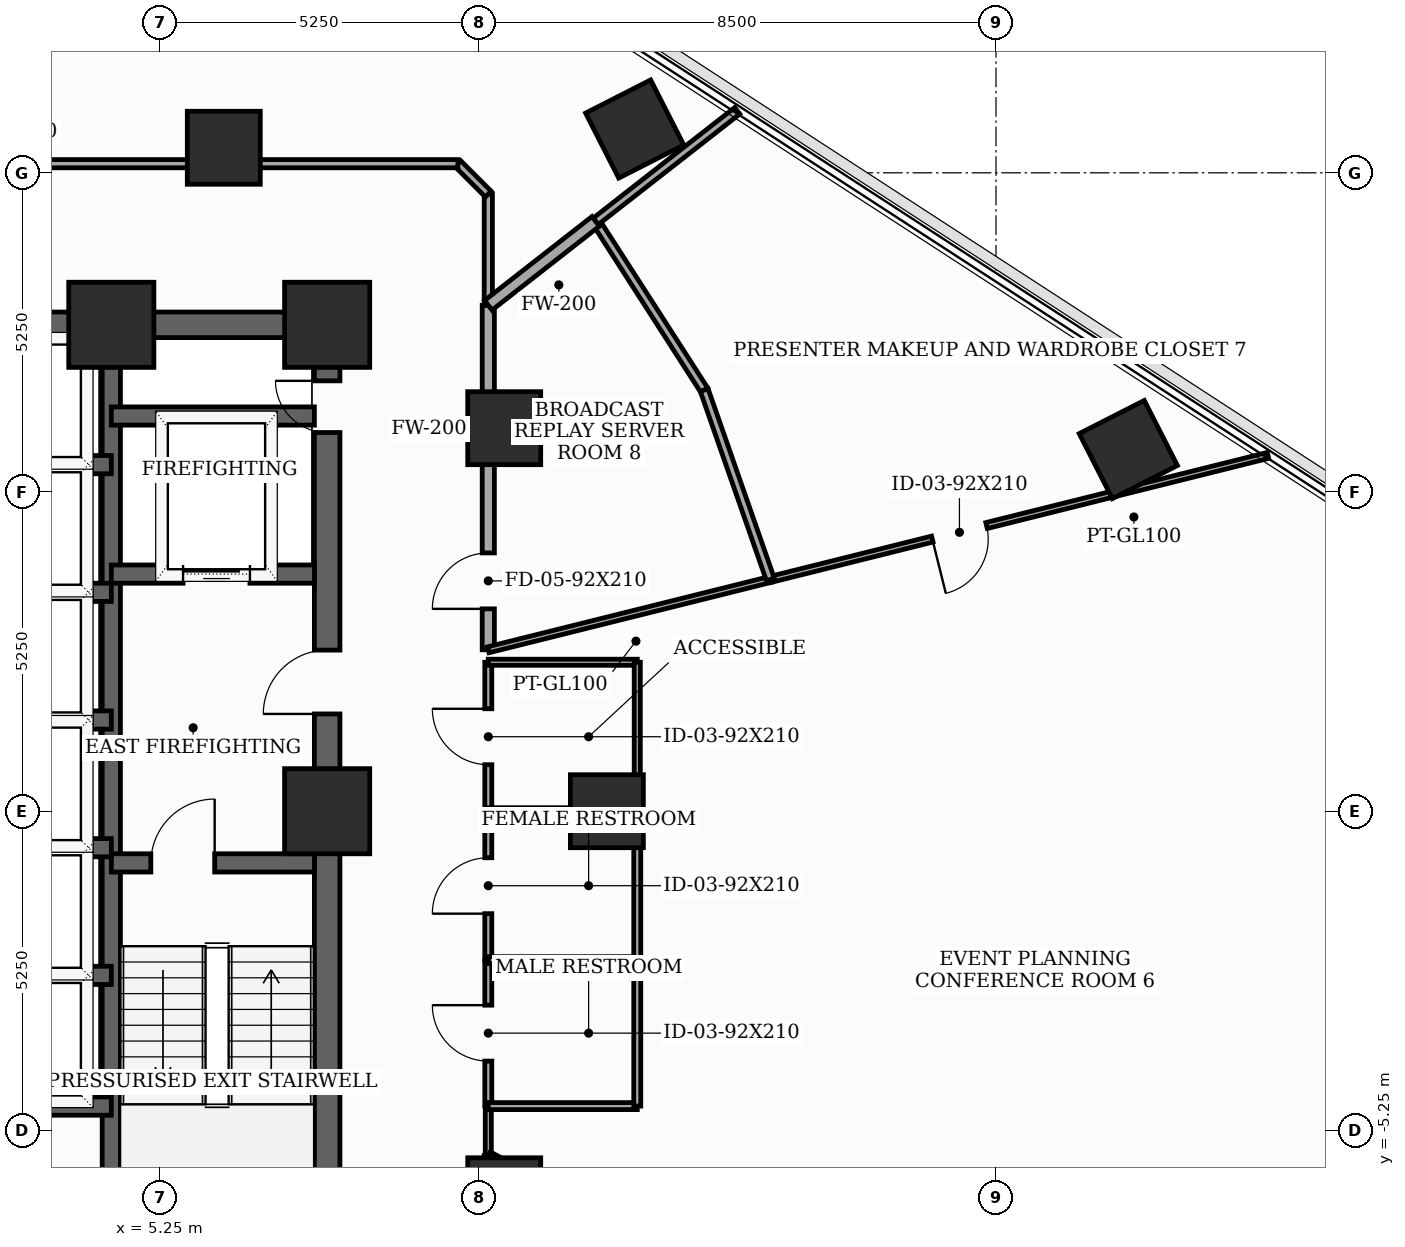
"""IFC4 building model, lengths in metres.
Left out: names, types, materials, properties, quantities, classifications, styles, units other than length and angle.
Written with IfcOpenShell. Run it as: python <this file> out.ifc"""

import sys

from ifc_helpers import new_model, si_unit, direction, frame, frame_2d, origin, origin_2d, place, context, subcontext, project, spatial, rectangle, extrude, element, fill, save


model = new_model("IFC4")
c1 = context("Model", 3, precision=1e-05, world=origin(), true_north=direction((0.0, 1.0)))
c2 = subcontext(c1, "Body", "Model", "MODEL_VIEW")
j1 = project(units=[si_unit("LENGTHUNIT", "METRE"), si_unit("PLANEANGLEUNIT", "RADIAN")], contexts=[c1])
p1 = place(None, origin())
s1 = spatial("IfcSite", under=j1, at=p1, CompositionType="ELEMENT")
p2 = place(p1, origin())
s2 = spatial("IfcBuilding", under=s1, at=p2, CompositionType="ELEMENT")
p3 = place(p2, frame((0.0, 0.0, 123.6)))
s3 = spatial("IfcBuildingStorey", under=s2, at=p3, CompositionType="ELEMENT", Elevation=123.6)
for number, where, z_axis, x_axis in (
    (1, (8.0, 0.0, 0.0), (0.0, 0.0, 1.0), (1.0, 0.0, 0.0)),
    (2, (8.0, 8.0, 0.0), (0.0, 0.0, 1.0), (1.0, 0.0, 0.0)),
    (3, (4.45, 8.0, 0.0), (0.0, 0.0, 1.0), (1.0, 0.0, 0.0)),
):
    element("IfcColumn", number, at=place(p3, frame(where, z_axis=z_axis, x_axis=x_axis)), inside=s3, PredefinedType="COLUMN", context=c2, shape_type="SweptSolid", body=[
        extrude(rectangle(XDim=1.4, YDim=1.4, at=origin_2d()), origin(), (0.0, 0.0, 1.0), 3.7),
    ])
for number, where, z_axis, x_axis in (
    (4, (12.6, 0.0, 0.0), (0.0, 0.0, 1.0), (1.0, 0.0, 0.0)),
    (5, (10.912, 6.3, 0.0), (0.0, 0.0, 1.0), (1.0, 0.0, 0.0)),
    (6, (6.3, 10.912, 0.0), (0.0, 0.0, 1.0), (1.0, 0.0, 0.0)),
    (7, (10.912, -6.3, 0.0), (0.0, 0.0, 1.0), (1.0, 0.0, 0.0)),
    (8, (21.176, 5.948, 0.0), (0.0, 0.0, 1.0), (0.891, 0.454, 0.0)),
    (9, (13.058, 11.22, 0.0), (0.0, 0.0, 1.0), (0.891, 0.454, 0.0)),
):
    element("IfcColumn", number, at=place(p3, frame(where, z_axis=z_axis, x_axis=x_axis)), inside=s3, PredefinedType="COLUMN", context=c2, shape_type="SweptSolid", body=[
        extrude(rectangle(XDim=1.2, YDim=1.2, at=origin_2d()), origin(), (0.0, 0.0, 1.0), 3.7),
    ])
p4 = place(p3, frame((8.0, -8.0, 0.0), z_axis=(0.0, 0.0, 1.0), x_axis=(0.0, 1.0, 0.0)))
e10 = element("IfcWall", 10, at=p4, inside=s3, PredefinedType="SHEAR", context=c2, shape_type="SweptSolid", body=[
    extrude(rectangle(XDim=16.0, YDim=0.42, at=frame_2d((8.0, 0.0))), origin(), (0.0, 0.0, 1.0), 3.5),
])
p5 = place(p4, frame((9.6, 0.0, 0.0)))
e11 = element("IfcOpeningElement", 11, at=p5, cuts=e10, PredefinedType="OPENING", context=c2, shape_type="SweptSolid", body=[
    extrude(rectangle(XDim=1.05, YDim=2.15, at=frame_2d((0.525, 1.075))), frame((0.0, 0.22, 0.0), z_axis=(0.0, -1.0, 0.0), x_axis=(1.0, 0.0, 0.0)), (0.0, 0.0, 1.0), 0.44),
])
p6 = place(p4, frame((14.229, 0.0, 0.0)))
e12 = element("IfcOpeningElement", 12, at=p6, cuts=e10, PredefinedType="OPENING", context=c2, shape_type="SweptSolid", body=[
    extrude(rectangle(XDim=0.85, YDim=2.02, at=frame_2d((0.425, 1.01))), frame((0.0, 0.22, 0.0), z_axis=(0.0, -1.0, 0.0), x_axis=(1.0, 0.0, 0.0)), (0.0, 0.0, 1.0), 0.44),
])
p7 = place(p3, frame((-8.0, 8.0, 0.0), z_axis=(0.0, 0.0, 1.0), x_axis=(1.0, 0.0, 0.0)))
e13 = element("IfcWall", 13, at=p7, inside=s3, PredefinedType="SHEAR", context=c2, shape_type="SweptSolid", body=[
    extrude(rectangle(XDim=16.0, YDim=0.42, at=frame_2d((8.0, 0.0))), origin(), (0.0, 0.0, 1.0), 3.5),
])
p8 = place(p7, frame((7.1, 0.0, 0.0)))
e14 = element("IfcOpeningElement", 14, at=p8, cuts=e13, PredefinedType="OPENING", context=c2, shape_type="SweptSolid", body=[
    extrude(rectangle(XDim=1.8, YDim=2.15, at=frame_2d((0.9, 1.075))), frame((0.0, 0.22, 0.0), z_axis=(0.0, -1.0, 0.0), x_axis=(1.0, 0.0, 0.0)), (0.0, 0.0, 1.0), 0.44),
])
p9 = place(p3, frame((4.45, -7.79, 0.0), z_axis=(0.0, 0.0, 1.0), x_axis=(0.0, 1.0, 0.0)))
e15 = element("IfcWall", 15, at=p9, inside=s3, PredefinedType="SHEAR", context=c2, shape_type="SweptSolid", body=[
    extrude(rectangle(XDim=15.58, YDim=0.3, at=frame_2d((7.79, 0.0))), origin(), (0.0, 0.0, 1.0), 3.5),
])
p10 = place(p3, frame((4.45, -0.85, 0.0), z_axis=(0.0, 0.0, 1.0), x_axis=(1.0, 0.0, 0.0)))
e16 = element("IfcWall", 16, at=p10, inside=s3, PredefinedType="SHEAR", context=c2, shape_type="SweptSolid", body=[
    extrude(rectangle(XDim=3.34, YDim=0.3, at=frame_2d((1.67, 0.0))), origin(), (0.0, 0.0, 1.0), 3.5),
])
p11 = place(p10, frame((0.65, 0.0, 0.0)))
e17 = element("IfcOpeningElement", 17, at=p11, cuts=e16, PredefinedType="OPENING", context=c2, shape_type="SweptSolid", body=[
    extrude(rectangle(XDim=1.05, YDim=2.15, at=frame_2d((0.525, 1.075))), frame((0.0, 0.16, 0.0), z_axis=(0.0, -1.0, 0.0), x_axis=(1.0, 0.0, 0.0)), (0.0, 0.0, 1.0), 0.32),
])
p12 = place(p3, frame((4.45, 3.9, 0.0), z_axis=(0.0, 0.0, 1.0), x_axis=(1.0, 0.0, 0.0)))
e18 = element("IfcWall", 18, at=p12, inside=s3, PredefinedType="SHEAR", context=c2, shape_type="SweptSolid", body=[
    extrude(rectangle(XDim=3.34, YDim=0.3, at=frame_2d((1.67, 0.0))), origin(), (0.0, 0.0, 1.0), 3.5),
])
p13 = place(p12, frame((1.18, 0.0, 0.0)))
e19 = element("IfcOpeningElement", 19, at=p13, cuts=e18, PredefinedType="OPENING", context=c2, shape_type="SweptSolid", body=[
    extrude(rectangle(XDim=1.1, YDim=2.1, at=frame_2d((0.55, 1.05))), frame((0.0, 0.16, 0.0), z_axis=(0.0, -1.0, 0.0), x_axis=(1.0, 0.0, 0.0)), (0.0, 0.0, 1.0), 0.32),
])
p14 = place(p3, frame((4.45, 6.5, 0.0), z_axis=(0.0, 0.0, 1.0), x_axis=(1.0, 0.0, 0.0)))
e20 = element("IfcWall", 20, at=p14, inside=s3, PredefinedType="SHEAR", context=c2, shape_type="SweptSolid", body=[
    extrude(rectangle(XDim=3.34, YDim=0.3, at=frame_2d((1.67, 0.0))), origin(), (0.0, 0.0, 1.0), 3.5),
])
p15 = place(p3, frame((-4.45, -4.85, 0.0), z_axis=(0.0, 0.0, 1.0), x_axis=(1.0, 0.0, 0.0)))
e21 = element("IfcWall", 21, at=p15, inside=s3, PredefinedType="SHEAR", context=c2, shape_type="SweptSolid", body=[
    extrude(rectangle(XDim=8.9, YDim=0.3, at=frame_2d((4.45, 0.0))), origin(), (0.0, 0.0, 1.0), 3.5),
])
for number, where, z_axis, x_axis in (
    (22, (1.68, 1.5, 0.0), (0.0, 0.0, 1.0), (1.0, 0.0, 0.0)),
    (23, (1.68, 3.6, 0.0), (0.0, 0.0, 1.0), (1.0, 0.0, 0.0)),
    (24, (1.68, 5.7, 0.0), (0.0, 0.0, 1.0), (1.0, 0.0, 0.0)),
    (25, (1.68, -2.7, 0.0), (0.0, 0.0, 1.0), (1.0, 0.0, 0.0)),
    (26, (1.68, -0.6, 0.0), (0.0, 0.0, 1.0), (1.0, 0.0, 0.0)),
):
    element("IfcWall", number, at=place(p3, frame(where, z_axis=z_axis, x_axis=x_axis)), inside=s3, PredefinedType="SHEAR", context=c2, shape_type="SweptSolid", body=[
        extrude(rectangle(XDim=2.77, YDim=0.3, at=frame_2d((1.385, 0.0))), origin(), (0.0, 0.0, 1.0), 3.5),
    ])
p16 = place(p3, frame((10.65, -10.15, 0.0), z_axis=(0.0, 0.0, 1.0), x_axis=(0.0, 1.0, 0.0)))
e27 = element("IfcWall", 27, at=p16, inside=s3, PredefinedType="PARTITIONING", context=c2, shape_type="SweptSolid", body=[
    extrude(rectangle(XDim=4.487, YDim=0.135, at=frame_2d((2.243, 0.0))), origin(), (0.0, 0.0, 1.0), 2.785),
])
p17 = place(p16, frame((0.781, 0.0, 0.0)))
e28 = element("IfcOpeningElement", 28, at=p17, cuts=e27, PredefinedType="OPENING", context=c2, shape_type="SweptSolid", body=[
    extrude(rectangle(XDim=0.95, YDim=2.1, at=frame_2d((0.475, 1.05))), frame((0.0, 0.077, 0.0), z_axis=(0.0, -1.0, 0.0), x_axis=(1.0, 0.0, 0.0)), (0.0, 0.0, 1.0), 0.155),
])
p18 = place(p3, frame((10.65, -4.85, 0.0), z_axis=(0.0, 0.0, 1.0), x_axis=(0.0, 1.0, 0.0)))
e29 = element("IfcWall", 29, at=p18, inside=s3, PredefinedType="PARTITIONING", context=c2, shape_type="SweptSolid", body=[
    extrude(rectangle(XDim=2.4, YDim=0.115, at=frame_2d((1.2, 0.0))), origin(), (0.0, 0.0, 1.0), 3.5),
])
p19 = place(p18, frame((0.74, 0.0, 0.0)))
e30 = element("IfcOpeningElement", 30, at=p19, cuts=e29, PredefinedType="OPENING", context=c2, shape_type="SweptSolid", body=[
    extrude(rectangle(XDim=0.92, YDim=2.1, at=frame_2d((0.46, 1.05))), frame((0.0, 0.067, 0.0), z_axis=(0.0, -1.0, 0.0), x_axis=(1.0, 0.0, 0.0)), (0.0, 0.0, 1.0), 0.135),
])
p20 = place(p3, frame((10.65, -2.45, 0.0), z_axis=(0.0, 0.0, 1.0), x_axis=(0.0, 1.0, 0.0)))
e31 = element("IfcWall", 31, at=p20, inside=s3, PredefinedType="PARTITIONING", context=c2, shape_type="SweptSolid", body=[
    extrude(rectangle(XDim=2.45, YDim=0.115, at=frame_2d((1.225, 0.0))), origin(), (0.0, 0.0, 1.0), 2.785),
])
p21 = place(p20, frame((0.765, 0.0, 0.0)))
e32 = element("IfcOpeningElement", 32, at=p21, cuts=e31, PredefinedType="OPENING", context=c2, shape_type="SweptSolid", body=[
    extrude(rectangle(XDim=0.92, YDim=2.1, at=frame_2d((0.46, 1.05))), frame((0.0, 0.067, 0.0), z_axis=(0.0, -1.0, 0.0), x_axis=(1.0, 0.0, 0.0)), (0.0, 0.0, 1.0), 0.135),
])
p22 = place(p3, frame((10.65, -5.663, 0.0), z_axis=(0.0, 0.0, 1.0), x_axis=(0.0, 1.0, 0.0)))
e33 = element("IfcWall", 33, at=p22, inside=s3, PredefinedType="MOVABLE", context=c2, shape_type="SweptSolid", body=[
    extrude(rectangle(XDim=0.813, YDim=0.1, at=frame_2d((0.406, 0.0))), origin(), (0.0, 0.0, 1.0), 3.5),
])
p23 = place(p3, frame((10.65, 0.0, 0.0), z_axis=(0.0, 0.0, 1.0), x_axis=(0.0, 1.0, 0.0)))
e34 = element("IfcWall", 34, at=p23, inside=s3, PredefinedType="PARTITIONING", context=c2, shape_type="SweptSolid", body=[
    extrude(rectangle(XDim=2.45, YDim=0.115, at=frame_2d((1.225, 0.0))), origin(), (0.0, 0.0, 1.0), 2.785),
])
p24 = place(p23, frame((0.765, 0.0, 0.0)))
e35 = element("IfcOpeningElement", 35, at=p24, cuts=e34, PredefinedType="OPENING", context=c2, shape_type="SweptSolid", body=[
    extrude(rectangle(XDim=0.92, YDim=2.1, at=frame_2d((0.46, 1.05))), frame((0.0, 0.067, 0.0), z_axis=(0.0, -1.0, 0.0), x_axis=(1.0, 0.0, 0.0)), (0.0, 0.0, 1.0), 0.135),
])
p25 = place(p3, frame((10.65, 2.655, 0.0), z_axis=(0.0, 0.0, 1.0), x_axis=(0.0, 1.0, 0.0)))
e36 = element("IfcWall", 36, at=p25, inside=s3, PredefinedType="SOLIDWALL", context=c2, shape_type="SweptSolid", body=[
    extrude(rectangle(XDim=5.666, YDim=0.2, at=frame_2d((2.833, 0.0))), origin(), (0.0, 0.0, 1.0), 2.785),
])
p26 = place(p25, frame((0.673, 0.0, 0.0)))
e37 = element("IfcOpeningElement", 37, at=p26, cuts=e36, PredefinedType="OPENING", context=c2, shape_type="SweptSolid", body=[
    extrude(rectangle(XDim=0.92, YDim=2.1, at=frame_2d((0.46, 1.05))), frame((0.0, 0.11, 0.0), z_axis=(0.0, -1.0, 0.0), x_axis=(1.0, 0.0, 0.0)), (0.0, 0.0, 1.0), 0.22),
])
p27 = place(p3, frame((10.65, 8.321, 0.0), z_axis=(0.0, 0.0, 1.0), x_axis=(0.0, 1.0, 0.0)))
e38 = element("IfcWall", 38, at=p27, inside=s3, PredefinedType="PARTITIONING", context=c2, shape_type="SweptSolid", body=[
    extrude(rectangle(XDim=1.829, YDim=0.135, at=frame_2d((0.915, 0.0))), origin(), (0.0, 0.0, 1.0), 3.125),
])
p28 = place(p3, frame((10.65, 10.15, 0.0), z_axis=(0.0, 0.0, 1.0), x_axis=(-0.707106781187, 0.707106781187, 0.0)))
e39 = element("IfcWall", 39, at=p28, inside=s3, PredefinedType="PARTITIONING", context=c2, shape_type="SweptSolid", body=[
    extrude(rectangle(XDim=0.707, YDim=0.135, at=frame_2d((0.354, 0.0))), origin(), (0.0, 0.0, 1.0), 3.125),
])
p29 = place(p3, frame((10.15, 10.65, 0.0), z_axis=(0.0, 0.0, 1.0), x_axis=(-1.0, 0.0, 0.0)))
e40 = element("IfcWall", 40, at=p29, inside=s3, PredefinedType="PARTITIONING", context=c2, shape_type="SweptSolid", body=[
    extrude(rectangle(XDim=12.414, YDim=0.135, at=frame_2d((6.207, 0.0))), origin(), (0.0, 0.0, 1.0), 2.785),
])
p30 = place(p29, frame((7.222, 0.0, 0.0)))
e41 = element("IfcOpeningElement", 41, at=p30, cuts=e40, PredefinedType="OPENING", context=c2, shape_type="SweptSolid", body=[
    extrude(rectangle(XDim=0.95, YDim=2.1, at=frame_2d((0.475, 1.05))), frame((0.0, 0.077, 0.0), z_axis=(0.0, -1.0, 0.0), x_axis=(1.0, 0.0, 0.0)), (0.0, 0.0, 1.0), 0.155),
])
p31 = place(p3, frame((14.137, -7.517, 0.0), z_axis=(0.0, 0.0, 1.0), x_axis=(-0.882957991608, 0.46945200506, 0.0)))
e42 = element("IfcWall", 42, at=p31, inside=s3, PredefinedType="PARTITIONING", context=c2, shape_type="SweptSolid", body=[
    extrude(rectangle(XDim=3.949, YDim=0.135, at=frame_2d((1.975, 0.0))), origin(), (0.0, 0.0, 1.0), 2.785),
])
p32 = place(p31, frame((0.33, 0.0, 0.0)))
e43 = element("IfcOpeningElement", 43, at=p32, cuts=e42, PredefinedType="OPENING", context=c2, shape_type="SweptSolid", body=[
    extrude(rectangle(XDim=0.92, YDim=2.1, at=frame_2d((0.46, 1.05))), frame((0.0, 0.077, 0.0), z_axis=(0.0, -1.0, 0.0), x_axis=(1.0, 0.0, 0.0)), (0.0, 0.0, 1.0), 0.155),
])
for number, where, z_axis, x_axis in (
    (44, (13.1, -2.45, 0.0), (0.0, 0.0, 1.0), (-1.0, 0.0, 0.0)),
    (45, (10.65, -4.85, 0.0), (0.0, 0.0, 1.0), (1.0, 0.0, 0.0)),
):
    element("IfcWall", number, at=place(p3, frame(where, z_axis=z_axis, x_axis=x_axis)), inside=s3, PredefinedType="PARTITIONING", context=c2, shape_type="SweptSolid", body=[
        extrude(rectangle(XDim=2.45, YDim=0.115, at=frame_2d((1.225, 0.0))), origin(), (0.0, 0.0, 1.0), 2.785),
    ])
p33 = place(p3, frame((13.1, -4.85, 0.0), z_axis=(0.0, 0.0, 1.0), x_axis=(0.0, 1.0, 0.0)))
e46 = element("IfcWall", 46, at=p33, inside=s3, PredefinedType="PARTITIONING", context=c2, shape_type="SweptSolid", body=[
    extrude(rectangle(XDim=2.4, YDim=0.115, at=frame_2d((1.2, 0.0))), origin(), (0.0, 0.0, 1.0), 3.5),
])
p34 = place(p3, frame((13.1, -2.45, 0.0), z_axis=(0.0, 0.0, 1.0), x_axis=(0.0, 1.0, 0.0)))
e47 = element("IfcWall", 47, at=p34, inside=s3, PredefinedType="PARTITIONING", context=c2, shape_type="SweptSolid", body=[
    extrude(rectangle(XDim=2.45, YDim=0.115, at=frame_2d((1.225, 0.0))), origin(), (0.0, 0.0, 1.0), 3.5),
])
p35 = place(p3, frame((13.1, 0.0, 0.0), z_axis=(0.0, 0.0, 1.0), x_axis=(-1.0, 0.0, 0.0)))
e48 = element("IfcWall", 48, at=p35, inside=s3, PredefinedType="PARTITIONING", context=c2, shape_type="SweptSolid", body=[
    extrude(rectangle(XDim=2.45, YDim=0.115, at=frame_2d((1.225, 0.0))), origin(), (0.0, 0.0, 1.0), 2.785),
])
p36 = place(p3, frame((10.65, 2.45, 0.0), z_axis=(0.0, 0.0, 1.0), x_axis=(1.0, 0.0, 0.0)))
e49 = element("IfcWall", 49, at=p36, inside=s3, PredefinedType="MOVABLE", context=c2, shape_type="SweptSolid", body=[
    extrude(rectangle(XDim=2.45, YDim=0.1, at=frame_2d((1.225, 0.0))), origin(), (0.0, 0.0, 1.0), 2.785),
])
p37 = place(p3, frame((13.1, 2.45, 0.0), z_axis=(0.0, 0.0, 1.0), x_axis=(0.0, -1.0, 0.0)))
e50 = element("IfcWall", 50, at=p37, inside=s3, PredefinedType="MOVABLE", context=c2, shape_type="SweptSolid", body=[
    extrude(rectangle(XDim=2.45, YDim=0.1, at=frame_2d((1.225, 0.0))), origin(), (0.0, 0.0, 1.0), 3.5),
])
p38 = place(p3, frame((23.472, 5.852, 0.0), z_axis=(0.0, 0.0, 1.0), x_axis=(-0.970293868859, -0.24192934517, 0.0)))
e51 = element("IfcWall", 51, at=p38, inside=s3, PredefinedType="MOVABLE", context=c2, shape_type="SweptSolid", body=[
    extrude(rectangle(XDim=8.433, YDim=0.1, at=frame_2d((4.217, 0.0))), origin(), (0.0, 0.0, 1.0), 2.985),
])
p39 = place(p38, frame((4.769, 0.0, 0.0)))
e52 = element("IfcOpeningElement", 52, at=p39, cuts=e51, PredefinedType="OPENING", context=c2, shape_type="SweptSolid", body=[
    extrude(rectangle(XDim=0.92, YDim=2.1, at=frame_2d((0.46, 1.05))), frame((0.0, 0.06, 0.0), z_axis=(0.0, -1.0, 0.0), x_axis=(1.0, 0.0, 0.0)), (0.0, 0.0, 1.0), 0.12),
])
p40 = place(p3, frame((15.289, 3.812, 0.0), z_axis=(0.0, 0.0, 1.0), x_axis=(-0.970280510542, -0.241982914402, 0.0)))
e53 = element("IfcWall", 53, at=p40, inside=s3, PredefinedType="MOVABLE", context=c2, shape_type="SweptSolid", body=[
    extrude(rectangle(XDim=4.781, YDim=0.1, at=frame_2d((2.391, 0.0))), origin(), (0.0, 0.0, 1.0), 2.785),
])
p41 = place(p3, frame((12.416, 9.701, 0.0), z_axis=(0.0, 0.0, 1.0), x_axis=(0.540981963117, -0.841034194062, 0.0)))
e54 = element("IfcWall", 54, at=p41, inside=s3, PredefinedType="PARTITIONING", context=c2, shape_type="SweptSolid", body=[
    extrude(rectangle(XDim=3.299, YDim=0.135, at=frame_2d((1.65, 0.0))), origin(), (0.0, 0.0, 1.0), 2.885),
])
p42 = place(p3, frame((14.201, 6.926, 0.0), z_axis=(0.0, 0.0, 1.0), x_axis=(0.329872352593, -0.944025545732, 0.0)))
e55 = element("IfcWall", 55, at=p42, inside=s3, PredefinedType="PARTITIONING", context=c2, shape_type="SweptSolid", body=[
    extrude(rectangle(XDim=3.299, YDim=0.135, at=frame_2d((1.649, 0.0))), origin(), (0.0, 0.0, 1.0), 2.885),
])
p43 = place(p3, frame((14.744, 11.52, 0.0), z_axis=(0.0, 0.0, 1.0), x_axis=(-0.788015604839, -0.615655265981, 0.0)))
e56 = element("IfcWall", 56, at=p43, inside=s3, PredefinedType="PARTITIONING", context=c2, shape_type="SweptSolid", body=[
    extrude(rectangle(XDim=2.955, YDim=0.135, at=frame_2d((1.478, 0.0))), origin(), (0.0, 0.0, 1.0), 2.885),
])
p44 = place(p3, frame((12.416, 9.701, 0.0), z_axis=(0.0, 0.0, 1.0), x_axis=(-0.788001252745, -0.615673635681, 0.0)))
e57 = element("IfcWall", 57, at=p44, inside=s3, PredefinedType="SOLIDWALL", context=c2, shape_type="SweptSolid", body=[
    extrude(rectangle(XDim=2.241, YDim=0.2, at=frame_2d((1.121, 0.0))), origin(), (0.0, 0.0, 1.0), 2.885),
])
p45 = place(p5, origin())
e58 = element("IfcDoor", 58, at=p45, inside=s3, OperationType="SINGLE_SWING_LEFT", PredefinedType="DOOR", context=c2, shape_type="SweptSolid", body=[
    extrude(rectangle(XDim=1.05, YDim=2.15, at=frame_2d((0.525, 1.075))), frame((0.0, 0.025, 0.0), z_axis=(0.0, -1.0, 0.0), x_axis=(1.0, 0.0, 0.0)), (0.0, 0.0, 1.0), 0.05),
])
fill(e11, e58)
p46 = place(p6, origin())
e59 = element("IfcDoor", 59, at=p46, inside=s3, OperationType="SINGLE_SWING_RIGHT", PredefinedType="TRAPDOOR", context=c2, shape_type="SweptSolid", body=[
    extrude(rectangle(XDim=0.85, YDim=2.02, at=frame_2d((0.425, 1.01))), frame((0.0, 0.025, 0.0), z_axis=(0.0, -1.0, 0.0), x_axis=(1.0, 0.0, 0.0)), (0.0, 0.0, 1.0), 0.05),
])
fill(e12, e59)
p47 = place(p11, origin())
e60 = element("IfcDoor", 60, at=p47, inside=s3, OperationType="SINGLE_SWING_RIGHT", PredefinedType="DOOR", context=c2, shape_type="SweptSolid", body=[
    extrude(rectangle(XDim=1.05, YDim=2.15, at=frame_2d((0.525, 1.075))), frame((0.0, 0.025, 0.0), z_axis=(0.0, -1.0, 0.0), x_axis=(1.0, 0.0, 0.0)), (0.0, 0.0, 1.0), 0.05),
])
fill(e17, e60)
p48 = place(p13, origin())
e61 = element("IfcDoor", 61, at=p48, inside=s3, OperationType="SLIDING_TO_LEFT", PredefinedType="DOOR", context=c2, shape_type="SweptSolid", body=[
    extrude(rectangle(XDim=1.1, YDim=2.1, at=frame_2d((0.55, 1.05))), frame((0.0, 0.025, 0.0), z_axis=(0.0, -1.0, 0.0), x_axis=(1.0, 0.0, 0.0)), (0.0, 0.0, 1.0), 0.05),
])
fill(e19, e61)
p49 = place(p19, origin())
e62 = element("IfcDoor", 62, at=p49, inside=s3, OperationType="SINGLE_SWING_RIGHT", PredefinedType="DOOR", context=c2, shape_type="SweptSolid", body=[
    extrude(rectangle(XDim=0.92, YDim=2.1, at=frame_2d((0.46, 1.05))), frame((0.0, 0.025, 0.0), z_axis=(0.0, -1.0, 0.0), x_axis=(1.0, 0.0, 0.0)), (0.0, 0.0, 1.0), 0.05),
])
fill(e30, e62)
p50 = place(p21, origin())
e63 = element("IfcDoor", 63, at=p50, inside=s3, OperationType="SINGLE_SWING_LEFT", PredefinedType="DOOR", context=c2, shape_type="SweptSolid", body=[
    extrude(rectangle(XDim=0.92, YDim=2.1, at=frame_2d((0.46, 1.05))), frame((0.0, 0.025, 0.0), z_axis=(0.0, -1.0, 0.0), x_axis=(1.0, 0.0, 0.0)), (0.0, 0.0, 1.0), 0.05),
])
fill(e32, e63)
p51 = place(p24, origin())
e64 = element("IfcDoor", 64, at=p51, inside=s3, OperationType="SINGLE_SWING_RIGHT", PredefinedType="DOOR", context=c2, shape_type="SweptSolid", body=[
    extrude(rectangle(XDim=0.92, YDim=2.1, at=frame_2d((0.46, 1.05))), frame((0.0, 0.025, 0.0), z_axis=(0.0, -1.0, 0.0), x_axis=(1.0, 0.0, 0.0)), (0.0, 0.0, 1.0), 0.05),
])
fill(e35, e64)
p52 = place(p26, origin())
e65 = element("IfcDoor", 65, at=p52, inside=s3, OperationType="SINGLE_SWING_LEFT", PredefinedType="DOOR", context=c2, shape_type="SweptSolid", body=[
    extrude(rectangle(XDim=0.92, YDim=2.1, at=frame_2d((0.46, 1.05))), frame((0.0, 0.025, 0.0), z_axis=(0.0, -1.0, 0.0), x_axis=(1.0, 0.0, 0.0)), (0.0, 0.0, 1.0), 0.05),
])
fill(e37, e65)
p53 = place(p39, origin())
e66 = element("IfcDoor", 66, at=p53, inside=s3, OperationType="SINGLE_SWING_RIGHT", PredefinedType="DOOR", context=c2, shape_type="SweptSolid", body=[
    extrude(rectangle(XDim=0.92, YDim=2.1, at=frame_2d((0.46, 1.05))), frame((0.0, 0.025, 0.0), z_axis=(0.0, -1.0, 0.0), x_axis=(1.0, 0.0, 0.0)), (0.0, 0.0, 1.0), 0.05),
])
fill(e52, e66)
save(model, sys.argv[1])
